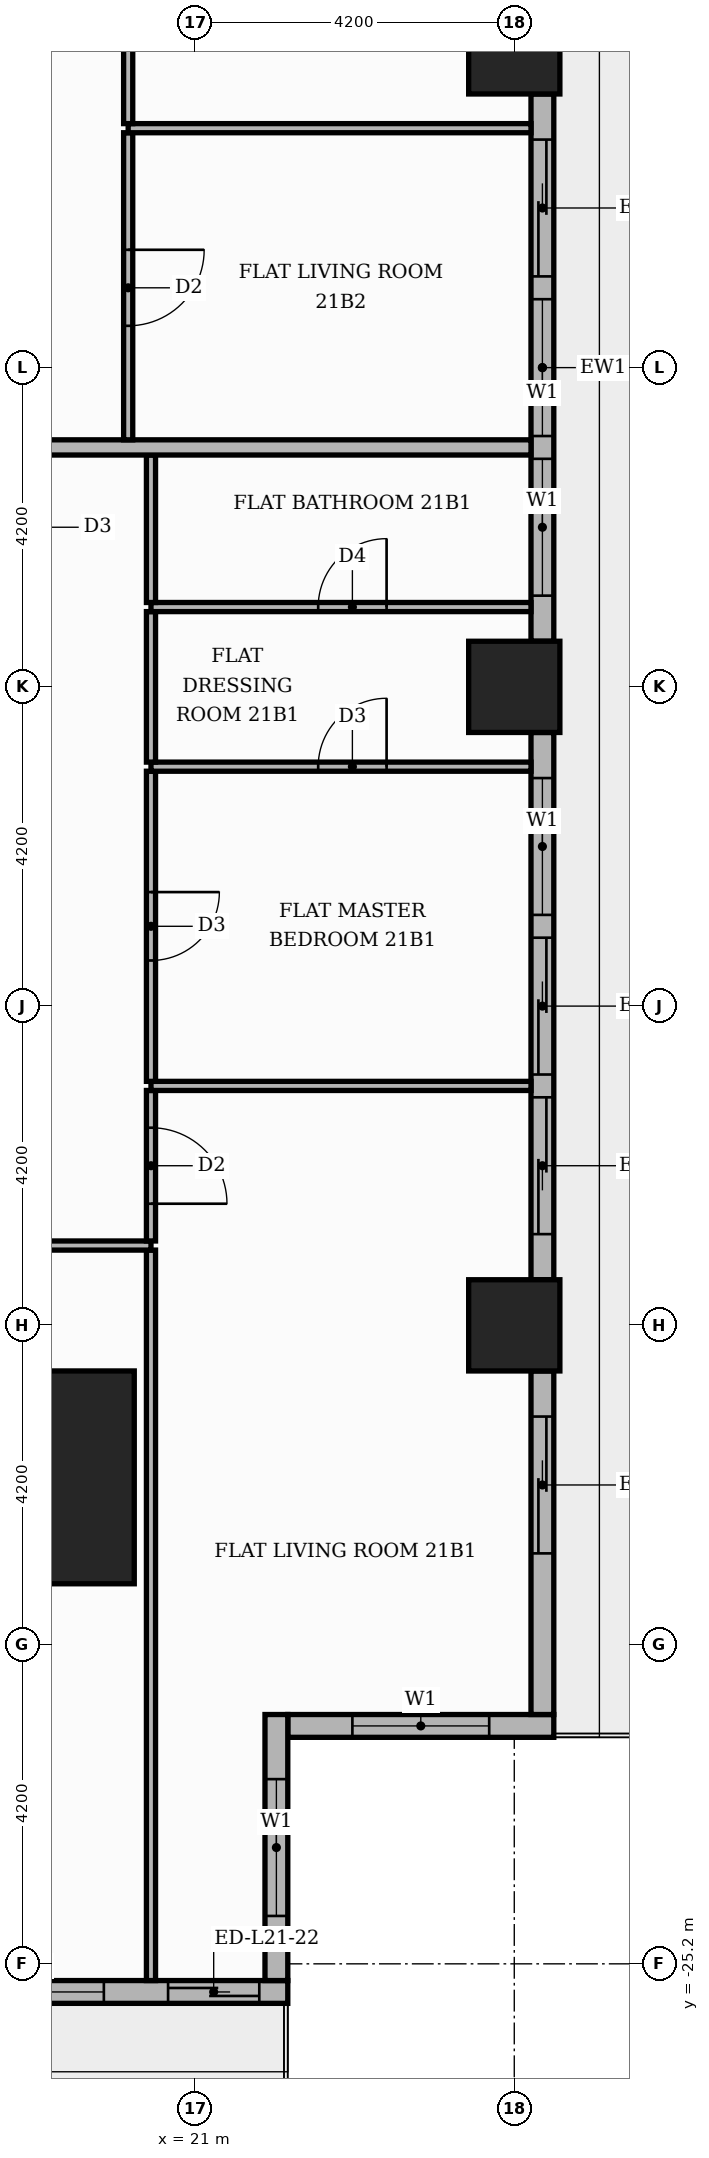
"""IFC4 building model, lengths in metres.
Left out: names, types, materials, properties, quantities, classifications, styles, units other than length and angle.
Written with IfcOpenShell. Run it as: python <this file> out.ifc"""

import sys

from ifc_helpers import new_model, si_unit, direction, frame, frame_2d, origin, origin_2d, place, context, subcontext, project, spatial, rectangle, extrude, element, fill, save


model = new_model("IFC4")
c1 = context("Model", 3, precision=1e-05, world=origin(), true_north=direction((0.0, 1.0)))
c2 = subcontext(c1, "Body", "Model", "MODEL_VIEW")
j1 = project(units=[si_unit("LENGTHUNIT", "METRE"), si_unit("PLANEANGLEUNIT", "RADIAN")], contexts=[c1])
p1 = place(None, origin())
s1 = spatial("IfcSite", under=j1, at=p1, CompositionType="ELEMENT")
p2 = place(p1, origin())
s2 = spatial("IfcBuilding", under=s1, at=p2, CompositionType="ELEMENT")
p3 = place(p2, frame((0.0, 0.0, 90.9)))
s3 = spatial("IfcBuildingStorey", under=s2, at=p3, CompositionType="ELEMENT", Elevation=90.9)
p4 = place(p3, frame((18.8, -18.8, 0.0), z_axis=(0.0, 0.0, 1.0), x_axis=(1.0, 0.0, 0.0)))
e1 = element("IfcColumn", 1, at=p4, inside=s3, PredefinedType="COLUMN", context=c2, shape_type="SweptSolid", body=[
    extrude(rectangle(XDim=2.8, YDim=2.8, at=origin_2d()), origin(), (0.0, 0.0, 1.0), 3.9),
])
for number, where, z_axis, x_axis in (
    (2, (25.2, 0.0, 0.0), (0.0, 0.0, 1.0), (1.0, 0.0, 0.0)),
    (3, (25.2, -8.4, 0.0), (0.0, 0.0, 1.0), (1.0, 0.0, 0.0)),
    (4, (25.2, -16.8, 0.0), (0.0, 0.0, 1.0), (1.0, 0.0, 0.0)),
):
    element("IfcColumn", number, at=place(p3, frame(where, z_axis=z_axis, x_axis=x_axis)), inside=s3, PredefinedType="COLUMN", context=c2, shape_type="SweptSolid", body=[
        extrude(rectangle(XDim=1.2, YDim=1.2, at=origin_2d()), origin(), (0.0, 0.0, 1.0), 3.9),
    ])
p5 = place(p3, frame((22.22, -22.07, 0.0), z_axis=(0.0, 0.0, 1.0), x_axis=(1.0, 0.0, 0.0)))
e5 = element("IfcWall", 5, at=p5, inside=s3, PredefinedType="STANDARD", context=c2, shape_type="SweptSolid", body=[
    extrude(rectangle(XDim=3.5, YDim=0.3, at=frame_2d((1.75, 0.0))), origin(), (0.0, 0.0, 1.0), 3.48),
])
p6 = place(p5, frame((0.85, 0.0, 0.9)))
e6 = element("IfcOpeningElement", 6, at=p6, cuts=e5, PredefinedType="OPENING", context=c2, shape_type="SweptSolid", body=[
    extrude(rectangle(XDim=1.8, YDim=2.1, at=frame_2d((0.9, 1.05))), frame((0.0, 0.16, 0.0), z_axis=(0.0, -1.0, 0.0), x_axis=(1.0, 0.0, 0.0)), (0.0, 0.0, 1.0), 0.32),
])
p7 = place(p3, frame((25.57, -21.92, 0.0), z_axis=(0.0, 0.0, 1.0), x_axis=(0.0, 1.0, 0.0)))
e7 = element("IfcWall", 7, at=p7, inside=s3, PredefinedType="STANDARD", context=c2, shape_type="SweptSolid", body=[
    extrude(rectangle(XDim=4.52, YDim=0.3, at=frame_2d((2.26, 0.0))), origin(), (0.0, 0.0, 1.0), 3.48),
])
p8 = place(p7, frame((2.12, 0.0, 0.0)))
e8 = element("IfcOpeningElement", 8, at=p8, cuts=e7, PredefinedType="OPENING", context=c2, shape_type="SweptSolid", body=[
    extrude(rectangle(XDim=1.8, YDim=2.4, at=frame_2d((0.9, 1.2))), frame((0.0, 0.16, 0.0), z_axis=(0.0, -1.0, 0.0), x_axis=(1.0, 0.0, 0.0)), (0.0, 0.0, 1.0), 0.32),
])
p9 = place(p3, frame((25.57, -16.2, 0.0), z_axis=(0.0, 0.0, 1.0), x_axis=(0.0, 1.0, 0.0)))
e9 = element("IfcWall", 9, at=p9, inside=s3, PredefinedType="STANDARD", context=c2, shape_type="SweptSolid", body=[
    extrude(rectangle(XDim=7.2, YDim=0.3, at=frame_2d((3.6, 0.0))), origin(), (0.0, 0.0, 1.0), 3.48),
])
p10 = place(p9, frame((0.6, 0.0, 0.0)))
e10 = element("IfcOpeningElement", 10, at=p10, cuts=e9, PredefinedType="OPENING", context=c2, shape_type="SweptSolid", body=[
    extrude(rectangle(XDim=1.8, YDim=2.4, at=frame_2d((0.9, 1.2))), frame((0.0, 0.16, 0.0), z_axis=(0.0, -1.0, 0.0), x_axis=(1.0, 0.0, 0.0)), (0.0, 0.0, 1.0), 0.32),
])
p11 = place(p9, frame((2.7, 0.0, 0.0)))
e11 = element("IfcOpeningElement", 11, at=p11, cuts=e9, PredefinedType="OPENING", context=c2, shape_type="SweptSolid", body=[
    extrude(rectangle(XDim=1.8, YDim=2.4, at=frame_2d((0.9, 1.2))), frame((0.0, 0.16, 0.0), z_axis=(0.0, -1.0, 0.0), x_axis=(1.0, 0.0, 0.0)), (0.0, 0.0, 1.0), 0.32),
])
p12 = place(p9, frame((4.8, 0.0, 0.9)))
e12 = element("IfcOpeningElement", 12, at=p12, cuts=e9, PredefinedType="OPENING", context=c2, shape_type="SweptSolid", body=[
    extrude(rectangle(XDim=1.8, YDim=2.1, at=frame_2d((0.9, 1.05))), frame((0.0, 0.16, 0.0), z_axis=(0.0, -1.0, 0.0), x_axis=(1.0, 0.0, 0.0)), (0.0, 0.0, 1.0), 0.32),
])
p13 = place(p3, frame((25.57, -7.8, 0.0), z_axis=(0.0, 0.0, 1.0), x_axis=(0.0, 1.0, 0.0)))
e13 = element("IfcWall", 13, at=p13, inside=s3, PredefinedType="STANDARD", context=c2, shape_type="SweptSolid", body=[
    extrude(rectangle(XDim=7.2, YDim=0.3, at=frame_2d((3.6, 0.0))), origin(), (0.0, 0.0, 1.0), 3.48),
])
p14 = place(p13, frame((0.6, 0.0, 0.9)))
e14 = element("IfcOpeningElement", 14, at=p14, cuts=e13, PredefinedType="OPENING", context=c2, shape_type="SweptSolid", body=[
    extrude(rectangle(XDim=1.8, YDim=2.1, at=frame_2d((0.9, 1.05))), frame((0.0, 0.16, 0.0), z_axis=(0.0, -1.0, 0.0), x_axis=(1.0, 0.0, 0.0)), (0.0, 0.0, 1.0), 0.32),
])
p15 = place(p13, frame((2.7, 0.0, 0.9)))
e15 = element("IfcOpeningElement", 15, at=p15, cuts=e13, PredefinedType="OPENING", context=c2, shape_type="SweptSolid", body=[
    extrude(rectangle(XDim=1.8, YDim=2.1, at=frame_2d((0.9, 1.05))), frame((0.0, 0.16, 0.0), z_axis=(0.0, -1.0, 0.0), x_axis=(1.0, 0.0, 0.0)), (0.0, 0.0, 1.0), 0.32),
])
p16 = place(p13, frame((4.8, 0.0, 0.0)))
e16 = element("IfcOpeningElement", 16, at=p16, cuts=e13, PredefinedType="OPENING", context=c2, shape_type="SweptSolid", body=[
    extrude(rectangle(XDim=1.8, YDim=2.4, at=frame_2d((0.9, 1.2))), frame((0.0, 0.16, 0.0), z_axis=(0.0, -1.0, 0.0), x_axis=(1.0, 0.0, 0.0)), (0.0, 0.0, 1.0), 0.32),
])
p17 = place(p3, frame((17.4, -25.57, 0.0), z_axis=(0.0, 0.0, 1.0), x_axis=(1.0, 0.0, 0.0)))
e17 = element("IfcWall", 17, at=p17, inside=s3, PredefinedType="STANDARD", context=c2, shape_type="SweptSolid", body=[
    extrude(rectangle(XDim=4.82, YDim=0.3, at=frame_2d((2.41, 0.0))), origin(), (0.0, 0.0, 1.0), 3.48),
])
p18 = place(p17, frame((0.6, 0.0, 0.9)))
e18 = element("IfcOpeningElement", 18, at=p18, cuts=e17, PredefinedType="OPENING", context=c2, shape_type="SweptSolid", body=[
    extrude(rectangle(XDim=1.8, YDim=2.1, at=frame_2d((0.9, 1.05))), frame((0.0, 0.16, 0.0), z_axis=(0.0, -1.0, 0.0), x_axis=(1.0, 0.0, 0.0)), (0.0, 0.0, 1.0), 0.32),
])
p19 = place(p17, frame((3.245, 0.0, 0.0)))
e19 = element("IfcOpeningElement", 19, at=p19, cuts=e17, PredefinedType="OPENING", context=c2, shape_type="SweptSolid", body=[
    extrude(rectangle(XDim=1.2, YDim=2.4, at=frame_2d((0.6, 1.2))), frame((0.0, 0.16, 0.0), z_axis=(0.0, -1.0, 0.0), x_axis=(1.0, 0.0, 0.0)), (0.0, 0.0, 1.0), 0.32),
])
p20 = place(p3, frame((22.07, -25.42, 0.0), z_axis=(0.0, 0.0, 1.0), x_axis=(0.0, 1.0, 0.0)))
e20 = element("IfcWall", 20, at=p20, inside=s3, PredefinedType="STANDARD", context=c2, shape_type="SweptSolid", body=[
    extrude(rectangle(XDim=3.5, YDim=0.3, at=frame_2d((1.75, 0.0))), origin(), (0.0, 0.0, 1.0), 3.48),
])
p21 = place(p20, frame((0.85, 0.0, 0.9)))
e21 = element("IfcOpeningElement", 21, at=p21, cuts=e20, PredefinedType="OPENING", context=c2, shape_type="SweptSolid", body=[
    extrude(rectangle(XDim=1.8, YDim=2.1, at=frame_2d((0.9, 1.05))), frame((0.0, 0.16, 0.0), z_axis=(0.0, -1.0, 0.0), x_axis=(1.0, 0.0, 0.0)), (0.0, 0.0, 1.0), 0.32),
])
p22 = place(p3, frame((20.42, -25.42, 0.0), z_axis=(0.0, 0.0, 1.0), x_axis=(0.0, 1.0, 0.0)))
e22 = element("IfcWall", 22, at=p22, inside=s3, PredefinedType="PARTITIONING", context=c2, shape_type="SweptSolid", body=[
    extrude(rectangle(XDim=9.61, YDim=0.12, at=frame_2d((4.805, 0.0))), origin(), (0.0, 0.0, 1.0), 3.48),
])
p23 = place(p3, frame((13.75, -15.75, 0.0), z_axis=(0.0, 0.0, 1.0), x_axis=(1.0, 0.0, 0.0)))
e23 = element("IfcWall", 23, at=p23, inside=s3, PredefinedType="PARTITIONING", context=c2, shape_type="SweptSolid", body=[
    extrude(rectangle(XDim=6.67, YDim=0.12, at=frame_2d((3.335, 0.0))), origin(), (0.0, 0.0, 1.0), 3.48),
])
p24 = place(p23, frame((2.785, 0.0, 0.0)))
e24 = element("IfcOpeningElement", 24, at=p24, cuts=e23, PredefinedType="OPENING", context=c2, shape_type="SweptSolid", body=[
    extrude(rectangle(XDim=1.0, YDim=2.1, at=frame_2d((0.5, 1.05))), frame((0.0, 0.07, 0.0), z_axis=(0.0, -1.0, 0.0), x_axis=(1.0, 0.0, 0.0)), (0.0, 0.0, 1.0), 0.14),
])
p25 = place(p3, frame((20.42, -15.69, 0.0), z_axis=(0.0, 0.0, 1.0), x_axis=(0.0, 1.0, 0.0)))
e25 = element("IfcWall", 25, at=p25, inside=s3, PredefinedType="PARTITIONING", context=c2, shape_type="SweptSolid", body=[
    extrude(rectangle(XDim=1.98, YDim=0.12, at=frame_2d((0.99, 0.0))), origin(), (0.0, 0.0, 1.0), 3.48),
])
p26 = place(p25, frame((0.49, 0.0, 0.0)))
e26 = element("IfcOpeningElement", 26, at=p26, cuts=e25, PredefinedType="OPENING", context=c2, shape_type="SweptSolid", body=[
    extrude(rectangle(XDim=1.0, YDim=2.1, at=frame_2d((0.5, 1.05))), frame((0.0, 0.07, 0.0), z_axis=(0.0, -1.0, 0.0), x_axis=(1.0, 0.0, 0.0)), (0.0, 0.0, 1.0), 0.14),
])
p27 = place(p3, frame((20.42, -13.65, 0.0), z_axis=(0.0, 0.0, 1.0), x_axis=(1.0, 0.0, 0.0)))
e27 = element("IfcWall", 27, at=p27, inside=s3, PredefinedType="PARTITIONING", context=c2, shape_type="SweptSolid", body=[
    extrude(rectangle(XDim=5.0, YDim=0.12, at=frame_2d((2.5, 0.0))), origin(), (0.0, 0.0, 1.0), 3.48),
])
p28 = place(p3, frame((20.42, -13.59, 0.0), z_axis=(0.0, 0.0, 1.0), x_axis=(0.0, 1.0, 0.0)))
e28 = element("IfcWall", 28, at=p28, inside=s3, PredefinedType="PARTITIONING", context=c2, shape_type="SweptSolid", body=[
    extrude(rectangle(XDim=4.08, YDim=0.12, at=frame_2d((2.04, 0.0))), origin(), (0.0, 0.0, 1.0), 3.48),
])
p29 = place(p28, frame((1.59, 0.0, 0.0)))
e29 = element("IfcOpeningElement", 29, at=p29, cuts=e28, PredefinedType="OPENING", context=c2, shape_type="SweptSolid", body=[
    extrude(rectangle(XDim=0.9, YDim=2.1, at=frame_2d((0.45, 1.05))), frame((0.0, 0.07, 0.0), z_axis=(0.0, -1.0, 0.0), x_axis=(1.0, 0.0, 0.0)), (0.0, 0.0, 1.0), 0.14),
])
p30 = place(p3, frame((20.42, -9.45, 0.0), z_axis=(0.0, 0.0, 1.0), x_axis=(1.0, 0.0, 0.0)))
e30 = element("IfcWall", 30, at=p30, inside=s3, PredefinedType="PARTITIONING", context=c2, shape_type="SweptSolid", body=[
    extrude(rectangle(XDim=5.0, YDim=0.12, at=frame_2d((2.5, 0.0))), origin(), (0.0, 0.0, 1.0), 3.48),
])
p31 = place(p30, frame((2.2, 0.0, 0.0)))
e31 = element("IfcOpeningElement", 31, at=p31, cuts=e30, PredefinedType="OPENING", context=c2, shape_type="SweptSolid", body=[
    extrude(rectangle(XDim=0.9, YDim=2.1, at=frame_2d((0.45, 1.05))), frame((0.0, 0.07, 0.0), z_axis=(0.0, -1.0, 0.0), x_axis=(1.0, 0.0, 0.0)), (0.0, 0.0, 1.0), 0.14),
])
p32 = place(p3, frame((20.42, -9.39, 0.0), z_axis=(0.0, 0.0, 1.0), x_axis=(0.0, 1.0, 0.0)))
e32 = element("IfcWall", 32, at=p32, inside=s3, PredefinedType="PARTITIONING", context=c2, shape_type="SweptSolid", body=[
    extrude(rectangle(XDim=1.98, YDim=0.12, at=frame_2d((0.99, 0.0))), origin(), (0.0, 0.0, 1.0), 3.48),
])
p33 = place(p3, frame((20.42, -7.35, 0.0), z_axis=(0.0, 0.0, 1.0), x_axis=(1.0, 0.0, 0.0)))
e33 = element("IfcWall", 33, at=p33, inside=s3, PredefinedType="PARTITIONING", context=c2, shape_type="SweptSolid", body=[
    extrude(rectangle(XDim=5.0, YDim=0.12, at=frame_2d((2.5, 0.0))), origin(), (0.0, 0.0, 1.0), 3.48),
])
p34 = place(p33, frame((2.2, 0.0, 0.0)))
e34 = element("IfcOpeningElement", 34, at=p34, cuts=e33, PredefinedType="OPENING", context=c2, shape_type="SweptSolid", body=[
    extrude(rectangle(XDim=0.9, YDim=2.1, at=frame_2d((0.45, 1.05))), frame((0.0, 0.07, 0.0), z_axis=(0.0, -1.0, 0.0), x_axis=(1.0, 0.0, 0.0)), (0.0, 0.0, 1.0), 0.14),
])
p35 = place(p3, frame((20.42, -7.29, 0.0), z_axis=(0.0, 0.0, 1.0), x_axis=(0.0, 1.0, 0.0)))
e35 = element("IfcWall", 35, at=p35, inside=s3, PredefinedType="PARTITIONING", context=c2, shape_type="SweptSolid", body=[
    extrude(rectangle(XDim=1.94, YDim=0.12, at=frame_2d((0.97, 0.0))), origin(), (0.0, 0.0, 1.0), 3.48),
])
p36 = place(p3, frame((13.65, -5.25, 0.0), z_axis=(0.0, 0.0, 1.0), x_axis=(1.0, 0.0, 0.0)))
e36 = element("IfcWall", 36, at=p36, inside=s3, PredefinedType="PARTITIONING", context=c2, shape_type="SweptSolid", body=[
    extrude(rectangle(XDim=11.77, YDim=0.2, at=frame_2d((5.885, 0.0))), origin(), (0.0, 0.0, 1.0), 3.48),
])
p37 = place(p3, frame((20.12, -5.15, 0.0), z_axis=(0.0, 0.0, 1.0), x_axis=(0.0, 1.0, 0.0)))
e37 = element("IfcWall", 37, at=p37, inside=s3, PredefinedType="PARTITIONING", context=c2, shape_type="SweptSolid", body=[
    extrude(rectangle(XDim=4.04, YDim=0.12, at=frame_2d((2.02, 0.0))), origin(), (0.0, 0.0, 1.0), 3.48),
])
p38 = place(p37, frame((1.5, 0.0, 0.0)))
e38 = element("IfcOpeningElement", 38, at=p38, cuts=e37, PredefinedType="OPENING", context=c2, shape_type="SweptSolid", body=[
    extrude(rectangle(XDim=1.0, YDim=2.1, at=frame_2d((0.5, 1.05))), frame((0.0, 0.07, 0.0), z_axis=(0.0, -1.0, 0.0), x_axis=(1.0, 0.0, 0.0)), (0.0, 0.0, 1.0), 0.14),
])
p39 = place(p3, frame((20.12, -1.05, 0.0), z_axis=(0.0, 0.0, 1.0), x_axis=(1.0, 0.0, 0.0)))
e39 = element("IfcWall", 39, at=p39, inside=s3, PredefinedType="PARTITIONING", context=c2, shape_type="SweptSolid", body=[
    extrude(rectangle(XDim=5.3, YDim=0.12, at=frame_2d((2.65, 0.0))), origin(), (0.0, 0.0, 1.0), 3.48),
])
p40 = place(p3, frame((20.12, -0.99, 0.0), z_axis=(0.0, 0.0, 1.0), x_axis=(0.0, 1.0, 0.0)))
e40 = element("IfcWall", 40, at=p40, inside=s3, PredefinedType="PARTITIONING", context=c2, shape_type="SweptSolid", body=[
    extrude(rectangle(XDim=4.08, YDim=0.12, at=frame_2d((2.04, 0.0))), origin(), (0.0, 0.0, 1.0), 3.48),
])
p41 = place(p40, frame((1.59, 0.0, 0.0)))
e41 = element("IfcOpeningElement", 41, at=p41, cuts=e40, PredefinedType="OPENING", context=c2, shape_type="SweptSolid", body=[
    extrude(rectangle(XDim=0.9, YDim=2.1, at=frame_2d((0.45, 1.05))), frame((0.0, 0.07, 0.0), z_axis=(0.0, -1.0, 0.0), x_axis=(1.0, 0.0, 0.0)), (0.0, 0.0, 1.0), 0.14),
])
p42 = place(p6, origin())
e42 = element("IfcWindow", 42, at=p42, inside=s3, PartitioningType="SINGLE_PANEL", PredefinedType="WINDOW", context=c2, shape_type="SweptSolid", body=[
    extrude(rectangle(XDim=1.8, YDim=2.1, at=frame_2d((0.9, 1.05))), frame((0.0, 0.03, 0.0), z_axis=(0.0, -1.0, 0.0), x_axis=(1.0, 0.0, 0.0)), (0.0, 0.0, 1.0), 0.06),
])
fill(e6, e42)
p43 = place(p8, origin())
e43 = element("IfcDoor", 43, at=p43, inside=s3, OperationType="SLIDING_TO_RIGHT", PredefinedType="DOOR", context=c2, shape_type="SweptSolid", body=[
    extrude(rectangle(XDim=1.8, YDim=2.4, at=frame_2d((0.9, 1.2))), frame((0.0, 0.025, 0.0), z_axis=(0.0, -1.0, 0.0), x_axis=(1.0, 0.0, 0.0)), (0.0, 0.0, 1.0), 0.05),
])
fill(e8, e43)
p44 = place(p10, origin())
e44 = element("IfcDoor", 44, at=p44, inside=s3, OperationType="SLIDING_TO_LEFT", PredefinedType="DOOR", context=c2, shape_type="SweptSolid", body=[
    extrude(rectangle(XDim=1.8, YDim=2.4, at=frame_2d((0.9, 1.2))), frame((0.0, 0.025, 0.0), z_axis=(0.0, -1.0, 0.0), x_axis=(1.0, 0.0, 0.0)), (0.0, 0.0, 1.0), 0.05),
])
fill(e10, e44)
p45 = place(p11, origin())
e45 = element("IfcDoor", 45, at=p45, inside=s3, OperationType="SLIDING_TO_RIGHT", PredefinedType="DOOR", context=c2, shape_type="SweptSolid", body=[
    extrude(rectangle(XDim=1.8, YDim=2.4, at=frame_2d((0.9, 1.2))), frame((0.0, 0.025, 0.0), z_axis=(0.0, -1.0, 0.0), x_axis=(1.0, 0.0, 0.0)), (0.0, 0.0, 1.0), 0.05),
])
fill(e11, e45)
p46 = place(p12, origin())
e46 = element("IfcWindow", 46, at=p46, inside=s3, PartitioningType="SINGLE_PANEL", PredefinedType="WINDOW", context=c2, shape_type="SweptSolid", body=[
    extrude(rectangle(XDim=1.8, YDim=2.1, at=frame_2d((0.9, 1.05))), frame((0.0, 0.03, 0.0), z_axis=(0.0, -1.0, 0.0), x_axis=(1.0, 0.0, 0.0)), (0.0, 0.0, 1.0), 0.06),
])
fill(e12, e46)
p47 = place(p14, origin())
e47 = element("IfcWindow", 47, at=p47, inside=s3, PartitioningType="SINGLE_PANEL", PredefinedType="WINDOW", context=c2, shape_type="SweptSolid", body=[
    extrude(rectangle(XDim=1.8, YDim=2.1, at=frame_2d((0.9, 1.05))), frame((0.0, 0.03, 0.0), z_axis=(0.0, -1.0, 0.0), x_axis=(1.0, 0.0, 0.0)), (0.0, 0.0, 1.0), 0.06),
])
fill(e14, e47)
p48 = place(p15, origin())
e48 = element("IfcWindow", 48, at=p48, inside=s3, PartitioningType="SINGLE_PANEL", PredefinedType="WINDOW", context=c2, shape_type="SweptSolid", body=[
    extrude(rectangle(XDim=1.8, YDim=2.1, at=frame_2d((0.9, 1.05))), frame((0.0, 0.03, 0.0), z_axis=(0.0, -1.0, 0.0), x_axis=(1.0, 0.0, 0.0)), (0.0, 0.0, 1.0), 0.06),
])
fill(e15, e48)
p49 = place(p16, origin())
e49 = element("IfcDoor", 49, at=p49, inside=s3, OperationType="SLIDING_TO_RIGHT", PredefinedType="DOOR", context=c2, shape_type="SweptSolid", body=[
    extrude(rectangle(XDim=1.8, YDim=2.4, at=frame_2d((0.9, 1.2))), frame((0.0, 0.025, 0.0), z_axis=(0.0, -1.0, 0.0), x_axis=(1.0, 0.0, 0.0)), (0.0, 0.0, 1.0), 0.05),
])
fill(e16, e49)
p50 = place(p18, origin())
e50 = element("IfcWindow", 50, at=p50, inside=s3, PartitioningType="SINGLE_PANEL", PredefinedType="WINDOW", context=c2, shape_type="SweptSolid", body=[
    extrude(rectangle(XDim=1.8, YDim=2.1, at=frame_2d((0.9, 1.05))), frame((0.0, 0.03, 0.0), z_axis=(0.0, -1.0, 0.0), x_axis=(1.0, 0.0, 0.0)), (0.0, 0.0, 1.0), 0.06),
])
fill(e18, e50)
p51 = place(p19, origin())
e51 = element("IfcDoor", 51, at=p51, inside=s3, OperationType="SLIDING_TO_RIGHT", PredefinedType="DOOR", context=c2, shape_type="SweptSolid", body=[
    extrude(rectangle(XDim=1.2, YDim=2.4, at=frame_2d((0.6, 1.2))), frame((0.0, 0.025, 0.0), z_axis=(0.0, -1.0, 0.0), x_axis=(1.0, 0.0, 0.0)), (0.0, 0.0, 1.0), 0.05),
])
fill(e19, e51)
p52 = place(p21, origin())
e52 = element("IfcWindow", 52, at=p52, inside=s3, PartitioningType="SINGLE_PANEL", PredefinedType="WINDOW", context=c2, shape_type="SweptSolid", body=[
    extrude(rectangle(XDim=1.8, YDim=2.1, at=frame_2d((0.9, 1.05))), frame((0.0, 0.03, 0.0), z_axis=(0.0, -1.0, 0.0), x_axis=(1.0, 0.0, 0.0)), (0.0, 0.0, 1.0), 0.06),
])
fill(e21, e52)
p53 = place(p26, frame((1.0, 0.0, 0.0), z_axis=(0.0, 0.0, 1.0), x_axis=(-1.0, 0.0, 0.0)))
e53 = element("IfcDoor", 53, at=p53, inside=s3, OperationType="SINGLE_SWING_LEFT", PredefinedType="DOOR", context=c2, shape_type="SweptSolid", body=[
    extrude(rectangle(XDim=1.0, YDim=2.1, at=frame_2d((0.5, 1.05))), frame((0.0, 0.025, 0.0), z_axis=(0.0, -1.0, 0.0), x_axis=(1.0, 0.0, 0.0)), (0.0, 0.0, 1.0), 0.05),
])
fill(e26, e53)
p54 = place(p29, frame((0.9, 0.0, 0.0), z_axis=(0.0, 0.0, 1.0), x_axis=(-1.0, 0.0, 0.0)))
e54 = element("IfcDoor", 54, at=p54, inside=s3, OperationType="SINGLE_SWING_RIGHT", PredefinedType="DOOR", context=c2, shape_type="SweptSolid", body=[
    extrude(rectangle(XDim=0.9, YDim=2.1, at=frame_2d((0.45, 1.05))), frame((0.0, 0.025, 0.0), z_axis=(0.0, -1.0, 0.0), x_axis=(1.0, 0.0, 0.0)), (0.0, 0.0, 1.0), 0.05),
])
fill(e29, e54)
p55 = place(p31, origin())
e55 = element("IfcDoor", 55, at=p55, inside=s3, OperationType="SINGLE_SWING_RIGHT", PredefinedType="DOOR", context=c2, shape_type="SweptSolid", body=[
    extrude(rectangle(XDim=0.9, YDim=2.1, at=frame_2d((0.45, 1.05))), frame((0.0, 0.025, 0.0), z_axis=(0.0, -1.0, 0.0), x_axis=(1.0, 0.0, 0.0)), (0.0, 0.0, 1.0), 0.05),
])
fill(e31, e55)
p56 = place(p34, origin())
e56 = element("IfcDoor", 56, at=p56, inside=s3, OperationType="SINGLE_SWING_RIGHT", PredefinedType="DOOR", context=c2, shape_type="SweptSolid", body=[
    extrude(rectangle(XDim=0.9, YDim=2.1, at=frame_2d((0.45, 1.05))), frame((0.0, 0.025, 0.0), z_axis=(0.0, -1.0, 0.0), x_axis=(1.0, 0.0, 0.0)), (0.0, 0.0, 1.0), 0.05),
])
fill(e34, e56)
p57 = place(p38, frame((1.0, 0.0, 0.0), z_axis=(0.0, 0.0, 1.0), x_axis=(-1.0, 0.0, 0.0)))
e57 = element("IfcDoor", 57, at=p57, inside=s3, OperationType="SINGLE_SWING_RIGHT", PredefinedType="DOOR", context=c2, shape_type="SweptSolid", body=[
    extrude(rectangle(XDim=1.0, YDim=2.1, at=frame_2d((0.5, 1.05))), frame((0.0, 0.025, 0.0), z_axis=(0.0, -1.0, 0.0), x_axis=(1.0, 0.0, 0.0)), (0.0, 0.0, 1.0), 0.05),
])
fill(e38, e57)
save(model, sys.argv[1])
